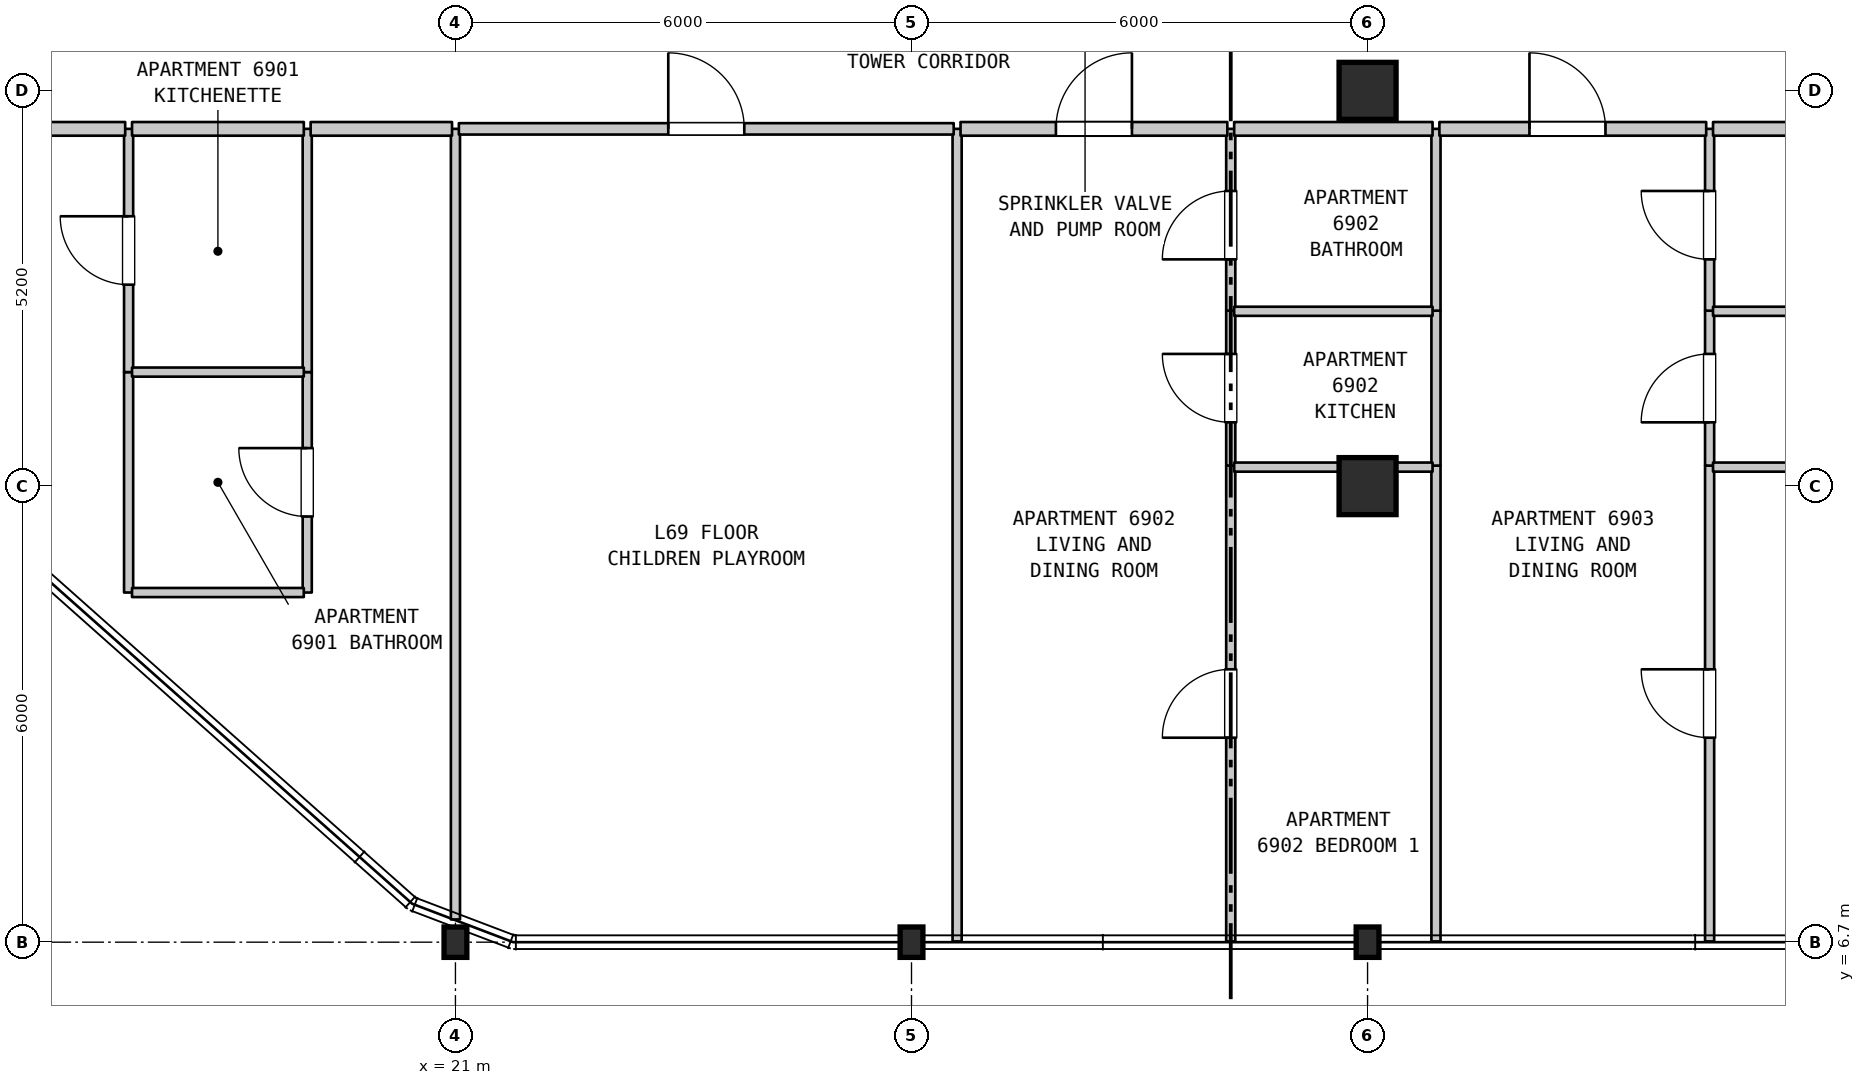
"""IFC4 building model, lengths in metres.
Left out: names, types, materials, properties, quantities, classifications, styles, units other than length and angle.
Written with IfcOpenShell. Run it as: python <this file> out.ifc"""

import sys

from ifc_helpers import new_model, si_unit, direction, frame, frame_2d, origin, origin_2d, place, context, subcontext, project, spatial, rectangle, i_section, extrude, element, fill, save


model = new_model("IFC4")
c1 = context("Model", 3, precision=1e-05, world=origin(), true_north=direction((0.0, 1.0)))
c2 = subcontext(c1, "Body", "Model", "MODEL_VIEW")
j1 = project(units=[si_unit("LENGTHUNIT", "METRE"), si_unit("PLANEANGLEUNIT", "RADIAN")], contexts=[c1])
p1 = place(None, origin())
s1 = spatial("IfcSite", under=j1, at=p1, CompositionType="ELEMENT")
p2 = place(p1, origin())
s2 = spatial("IfcBuilding", under=s1, at=p2, CompositionType="ELEMENT")
p3 = place(p2, frame((0.0, 0.0, 276.9)))
s3 = spatial("IfcBuildingStorey", under=s2, at=p3, CompositionType="ELEMENT", Elevation=276.9)
for number, where, z_axis, x_axis in (
    (1, (21.0, 6.7, 0.0), (0.0, 0.0, 1.0), (1.0, 0.0, 0.0)),
    (2, (27.0, 6.7, 0.0), (0.0, 0.0, 1.0), (1.0, 0.0, 0.0)),
    (3, (33.0, 6.7, 0.0), (0.0, 0.0, 1.0), (1.0, 0.0, 0.0)),
):
    element("IfcColumn", number, at=place(p3, frame(where, z_axis=z_axis, x_axis=x_axis)), inside=s3, PredefinedType="COLUMN", context=c2, shape_type="SweptSolid", body=[
        extrude(i_section(OverallWidth=0.3, OverallDepth=0.4, WebThickness=0.013, FlangeThickness=0.024, FilletRadius=0.027, at=origin_2d()), origin(), (0.0, 0.0, 1.0), 3.7),
    ])
for number, where, z_axis, x_axis in (
    (4, (33.0, 12.7, 0.0), (0.0, 0.0, 1.0), (1.0, 0.0, 0.0)),
    (5, (33.0, 17.9, 0.0), (0.0, 0.0, 1.0), (1.0, 0.0, 0.0)),
):
    element("IfcColumn", number, at=place(p3, frame(where, z_axis=z_axis, x_axis=x_axis)), inside=s3, PredefinedType="COLUMN", context=c2, shape_type="SweptSolid", body=[
        extrude(rectangle(XDim=0.75, YDim=0.75, at=origin_2d()), origin(), (0.0, 0.0, 1.0), 3.7),
    ])
p4 = place(p3, frame((16.7, 11.3, 0.0), z_axis=(0.0, 0.0, 1.0), x_axis=(0.0, 1.0, 0.0)))
e6 = element("IfcWall", 6, at=p4, inside=s3, PredefinedType="PARTITIONING", context=c2, shape_type="SweptSolid", body=[
    extrude(rectangle(XDim=2.9, YDim=0.12, at=frame_2d((1.45, 0.0))), origin(), (0.0, 0.0, 1.0), 3.39),
])
p5 = place(p3, frame((16.7, 14.2, 0.0), z_axis=(0.0, 0.0, 1.0), x_axis=(0.0, 1.0, 0.0)))
e7 = element("IfcWall", 7, at=p5, inside=s3, PredefinedType="PARTITIONING", context=c2, shape_type="SweptSolid", body=[
    extrude(rectangle(XDim=3.2, YDim=0.12, at=frame_2d((1.6, 0.0))), origin(), (0.0, 0.0, 1.0), 3.39),
])
p6 = place(p5, frame((1.15, 0.0, 0.0)))
e8 = element("IfcOpeningElement", 8, at=p6, cuts=e7, PredefinedType="OPENING", context=c2, shape_type="SweptSolid", body=[
    extrude(rectangle(XDim=0.9, YDim=2.15, at=frame_2d((0.45, 1.075))), frame((0.0, 0.07, 0.0), z_axis=(0.0, -1.0, 0.0), x_axis=(1.0, 0.0, 0.0)), (0.0, 0.0, 1.0), 0.14),
])
p7 = place(p3, frame((19.05, 11.3, 0.0), z_axis=(0.0, 0.0, 1.0), x_axis=(0.0, 1.0, 0.0)))
e9 = element("IfcWall", 9, at=p7, inside=s3, PredefinedType="PARTITIONING", context=c2, shape_type="SweptSolid", body=[
    extrude(rectangle(XDim=2.9, YDim=0.12, at=frame_2d((1.45, 0.0))), origin(), (0.0, 0.0, 1.0), 3.39),
])
p8 = place(p7, frame((1.0, 0.0, 0.0)))
e10 = element("IfcOpeningElement", 10, at=p8, cuts=e9, PredefinedType="OPENING", context=c2, shape_type="SweptSolid", body=[
    extrude(rectangle(XDim=0.9, YDim=2.1, at=frame_2d((0.45, 1.05))), frame((0.0, 0.07, 0.0), z_axis=(0.0, -1.0, 0.0), x_axis=(1.0, 0.0, 0.0)), (0.0, 0.0, 1.0), 0.14),
])
p9 = place(p3, frame((19.05, 14.2, 0.0), z_axis=(0.0, 0.0, 1.0), x_axis=(0.0, 1.0, 0.0)))
e11 = element("IfcWall", 11, at=p9, inside=s3, PredefinedType="PARTITIONING", context=c2, shape_type="SweptSolid", body=[
    extrude(rectangle(XDim=3.2, YDim=0.12, at=frame_2d((1.6, 0.0))), origin(), (0.0, 0.0, 1.0), 3.39),
])
p10 = place(p3, frame((21.0, 6.999, 0.0), z_axis=(0.0, 0.0, 1.0), x_axis=(0.0, 1.0, 0.0)))
e12 = element("IfcWall", 12, at=p10, inside=s3, PredefinedType="PARTITIONING", context=c2, shape_type="SweptSolid", body=[
    extrude(rectangle(XDim=10.401, YDim=0.12, at=frame_2d((5.2, 0.0))), origin(), (0.0, 0.0, 1.0), 3.39),
])
p11 = place(p3, frame((27.6, 6.71, 0.0), z_axis=(0.0, 0.0, 1.0), x_axis=(0.0, 1.0, 0.0)))
e13 = element("IfcWall", 13, at=p11, inside=s3, PredefinedType="PARTITIONING", context=c2, shape_type="SweptSolid", body=[
    extrude(rectangle(XDim=10.69, YDim=0.12, at=frame_2d((5.345, 0.0))), origin(), (0.0, 0.0, 1.0), 3.39),
])
p12 = place(p3, frame((31.2, 6.71, 0.0), z_axis=(0.0, 0.0, 1.0), x_axis=(0.0, 1.0, 0.0)))
e14 = element("IfcWall", 14, at=p12, inside=s3, PredefinedType="PARTITIONING", context=c2, shape_type="SweptSolid", body=[
    extrude(rectangle(XDim=6.26, YDim=0.12, at=frame_2d((3.13, 0.0))), origin(), (0.0, 0.0, 1.0), 3.39),
])
p13 = place(p12, frame((2.68, 0.0, 0.0)))
e15 = element("IfcOpeningElement", 15, at=p13, cuts=e14, PredefinedType="OPENING", context=c2, shape_type="SweptSolid", body=[
    extrude(rectangle(XDim=0.9, YDim=2.15, at=frame_2d((0.45, 1.075))), frame((0.0, 0.07, 0.0), z_axis=(0.0, -1.0, 0.0), x_axis=(1.0, 0.0, 0.0)), (0.0, 0.0, 1.0), 0.14),
])
p14 = place(p3, frame((31.2, 12.97, 0.0), z_axis=(0.0, 0.0, 1.0), x_axis=(0.0, 1.0, 0.0)))
e16 = element("IfcWall", 16, at=p14, inside=s3, PredefinedType="PARTITIONING", context=c2, shape_type="SweptSolid", body=[
    extrude(rectangle(XDim=2.038, YDim=0.12, at=frame_2d((1.019, 0.0))), origin(), (0.0, 0.0, 1.0), 3.39),
])
p15 = place(p14, frame((0.569, 0.0, 0.0)))
e17 = element("IfcOpeningElement", 17, at=p15, cuts=e16, PredefinedType="OPENING", context=c2, shape_type="SweptSolid", body=[
    extrude(rectangle(XDim=0.9, YDim=2.15, at=frame_2d((0.45, 1.075))), frame((0.0, 0.07, 0.0), z_axis=(0.0, -1.0, 0.0), x_axis=(1.0, 0.0, 0.0)), (0.0, 0.0, 1.0), 0.14),
])
p16 = place(p3, frame((31.2, 15.008, 0.0), z_axis=(0.0, 0.0, 1.0), x_axis=(0.0, 1.0, 0.0)))
e18 = element("IfcWall", 18, at=p16, inside=s3, PredefinedType="PARTITIONING", context=c2, shape_type="SweptSolid", body=[
    extrude(rectangle(XDim=2.392, YDim=0.12, at=frame_2d((1.196, 0.0))), origin(), (0.0, 0.0, 1.0), 3.39),
])
p17 = place(p16, frame((0.675, 0.0, 0.0)))
e19 = element("IfcOpeningElement", 19, at=p17, cuts=e18, PredefinedType="OPENING", context=c2, shape_type="SweptSolid", body=[
    extrude(rectangle(XDim=0.9, YDim=2.1, at=frame_2d((0.45, 1.05))), frame((0.0, 0.07, 0.0), z_axis=(0.0, -1.0, 0.0), x_axis=(1.0, 0.0, 0.0)), (0.0, 0.0, 1.0), 0.14),
])
p18 = place(p3, frame((33.9, 6.71, 0.0), z_axis=(0.0, 0.0, 1.0), x_axis=(0.0, 1.0, 0.0)))
e20 = element("IfcWall", 20, at=p18, inside=s3, PredefinedType="PARTITIONING", context=c2, shape_type="SweptSolid", body=[
    extrude(rectangle(XDim=6.26, YDim=0.12, at=frame_2d((3.13, 0.0))), origin(), (0.0, 0.0, 1.0), 3.39),
])
p19 = place(p3, frame((33.9, 12.97, 0.0), z_axis=(0.0, 0.0, 1.0), x_axis=(0.0, 1.0, 0.0)))
e21 = element("IfcWall", 21, at=p19, inside=s3, PredefinedType="PARTITIONING", context=c2, shape_type="SweptSolid", body=[
    extrude(rectangle(XDim=2.038, YDim=0.12, at=frame_2d((1.019, 0.0))), origin(), (0.0, 0.0, 1.0), 3.39),
])
p20 = place(p3, frame((33.9, 15.008, 0.0), z_axis=(0.0, 0.0, 1.0), x_axis=(0.0, 1.0, 0.0)))
e22 = element("IfcWall", 22, at=p20, inside=s3, PredefinedType="PARTITIONING", context=c2, shape_type="SweptSolid", body=[
    extrude(rectangle(XDim=2.392, YDim=0.12, at=frame_2d((1.196, 0.0))), origin(), (0.0, 0.0, 1.0), 3.39),
])
p21 = place(p3, frame((37.5, 6.71, 0.0), z_axis=(0.0, 0.0, 1.0), x_axis=(0.0, 1.0, 0.0)))
e23 = element("IfcWall", 23, at=p21, inside=s3, PredefinedType="PARTITIONING", context=c2, shape_type="SweptSolid", body=[
    extrude(rectangle(XDim=6.26, YDim=0.12, at=frame_2d((3.13, 0.0))), origin(), (0.0, 0.0, 1.0), 3.39),
])
p22 = place(p21, frame((2.68, 0.0, 0.0)))
e24 = element("IfcOpeningElement", 24, at=p22, cuts=e23, PredefinedType="OPENING", context=c2, shape_type="SweptSolid", body=[
    extrude(rectangle(XDim=0.9, YDim=2.15, at=frame_2d((0.45, 1.075))), frame((0.0, 0.07, 0.0), z_axis=(0.0, -1.0, 0.0), x_axis=(1.0, 0.0, 0.0)), (0.0, 0.0, 1.0), 0.14),
])
p23 = place(p3, frame((37.5, 12.97, 0.0), z_axis=(0.0, 0.0, 1.0), x_axis=(0.0, 1.0, 0.0)))
e25 = element("IfcWall", 25, at=p23, inside=s3, PredefinedType="PARTITIONING", context=c2, shape_type="SweptSolid", body=[
    extrude(rectangle(XDim=2.038, YDim=0.12, at=frame_2d((1.019, 0.0))), origin(), (0.0, 0.0, 1.0), 3.39),
])
p24 = place(p23, frame((0.569, 0.0, 0.0)))
e26 = element("IfcOpeningElement", 26, at=p24, cuts=e25, PredefinedType="OPENING", context=c2, shape_type="SweptSolid", body=[
    extrude(rectangle(XDim=0.9, YDim=2.15, at=frame_2d((0.45, 1.075))), frame((0.0, 0.07, 0.0), z_axis=(0.0, -1.0, 0.0), x_axis=(1.0, 0.0, 0.0)), (0.0, 0.0, 1.0), 0.14),
])
p25 = place(p3, frame((37.5, 15.008, 0.0), z_axis=(0.0, 0.0, 1.0), x_axis=(0.0, 1.0, 0.0)))
e27 = element("IfcWall", 27, at=p25, inside=s3, PredefinedType="PARTITIONING", context=c2, shape_type="SweptSolid", body=[
    extrude(rectangle(XDim=2.392, YDim=0.12, at=frame_2d((1.196, 0.0))), origin(), (0.0, 0.0, 1.0), 3.39),
])
p26 = place(p25, frame((0.675, 0.0, 0.0)))
e28 = element("IfcOpeningElement", 28, at=p26, cuts=e27, PredefinedType="OPENING", context=c2, shape_type="SweptSolid", body=[
    extrude(rectangle(XDim=0.9, YDim=2.1, at=frame_2d((0.45, 1.05))), frame((0.0, 0.07, 0.0), z_axis=(0.0, -1.0, 0.0), x_axis=(1.0, 0.0, 0.0)), (0.0, 0.0, 1.0), 0.14),
])
p27 = place(p3, frame((16.745, 11.3, 0.0), z_axis=(0.0, 0.0, 1.0), x_axis=(1.0, 0.0, 0.0)))
e29 = element("IfcWall", 29, at=p27, inside=s3, PredefinedType="PARTITIONING", context=c2, shape_type="SweptSolid", body=[
    extrude(rectangle(XDim=2.26, YDim=0.12, at=frame_2d((1.13, 0.0))), origin(), (0.0, 0.0, 1.0), 3.39),
])
p28 = place(p3, frame((31.245, 12.95, 0.0), z_axis=(0.0, 0.0, 1.0), x_axis=(1.0, 0.0, 0.0)))
e30 = element("IfcWall", 30, at=p28, inside=s3, PredefinedType="PARTITIONING", context=c2, shape_type="SweptSolid", body=[
    extrude(rectangle(XDim=2.61, YDim=0.12, at=frame_2d((1.305, 0.0))), origin(), (0.0, 0.0, 1.0), 3.39),
])
p29 = place(p3, frame((37.545, 12.95, 0.0), z_axis=(0.0, 0.0, 1.0), x_axis=(1.0, 0.0, 0.0)))
e31 = element("IfcWall", 31, at=p29, inside=s3, PredefinedType="PARTITIONING", context=c2, shape_type="SweptSolid", body=[
    extrude(rectangle(XDim=5.329, YDim=0.12, at=frame_2d((2.665, 0.0))), origin(), (0.0, 0.0, 1.0), 3.39),
])
p30 = place(p3, frame((16.745, 14.2, 0.0), z_axis=(0.0, 0.0, 1.0), x_axis=(1.0, 0.0, 0.0)))
e32 = element("IfcWall", 32, at=p30, inside=s3, PredefinedType="PARTITIONING", context=c2, shape_type="SweptSolid", body=[
    extrude(rectangle(XDim=2.26, YDim=0.12, at=frame_2d((1.13, 0.0))), origin(), (0.0, 0.0, 1.0), 3.39),
])
p31 = place(p3, frame((31.245, 15.0, 0.0), z_axis=(0.0, 0.0, 1.0), x_axis=(1.0, 0.0, 0.0)))
e33 = element("IfcWall", 33, at=p31, inside=s3, PredefinedType="PARTITIONING", context=c2, shape_type="SweptSolid", body=[
    extrude(rectangle(XDim=2.61, YDim=0.12, at=frame_2d((1.305, 0.0))), origin(), (0.0, 0.0, 1.0), 3.39),
])
p32 = place(p3, frame((37.545, 15.0, 0.0), z_axis=(0.0, 0.0, 1.0), x_axis=(1.0, 0.0, 0.0)))
e34 = element("IfcWall", 34, at=p32, inside=s3, PredefinedType="PARTITIONING", context=c2, shape_type="SweptSolid", body=[
    extrude(rectangle(XDim=5.619, YDim=0.12, at=frame_2d((2.81, 0.0))), origin(), (0.0, 0.0, 1.0), 3.39),
])
p33 = place(p3, frame((12.975, 17.4, 0.0), z_axis=(0.0, 0.0, 1.0), x_axis=(1.0, 0.0, 0.0)))
e35 = element("IfcWall", 35, at=p33, inside=s3, PredefinedType="STANDARD", context=c2, shape_type="SweptSolid", body=[
    extrude(rectangle(XDim=3.68, YDim=0.18, at=frame_2d((1.84, 0.0))), origin(), (0.0, 0.0, 1.0), 3.39),
])
p34 = place(p33, frame((0.322, 0.0, 0.0)))
e36 = element("IfcOpeningElement", 36, at=p34, cuts=e35, PredefinedType="OPENING", context=c2, shape_type="SweptSolid", body=[
    extrude(rectangle(XDim=1.0, YDim=2.15, at=frame_2d((0.5, 1.075))), frame((0.0, 0.1, 0.0), z_axis=(0.0, -1.0, 0.0), x_axis=(1.0, 0.0, 0.0)), (0.0, 0.0, 1.0), 0.2),
])
p35 = place(p3, frame((16.745, 17.4, 0.0), z_axis=(0.0, 0.0, 1.0), x_axis=(1.0, 0.0, 0.0)))
e37 = element("IfcWall", 37, at=p35, inside=s3, PredefinedType="STANDARD", context=c2, shape_type="SweptSolid", body=[
    extrude(rectangle(XDim=2.26, YDim=0.18, at=frame_2d((1.13, 0.0))), origin(), (0.0, 0.0, 1.0), 3.39),
])
p36 = place(p3, frame((19.095, 17.4, 0.0), z_axis=(0.0, 0.0, 1.0), x_axis=(1.0, 0.0, 0.0)))
e38 = element("IfcWall", 38, at=p36, inside=s3, PredefinedType="STANDARD", context=c2, shape_type="SweptSolid", body=[
    extrude(rectangle(XDim=1.86, YDim=0.18, at=frame_2d((0.93, 0.0))), origin(), (0.0, 0.0, 1.0), 3.39),
])
p37 = place(p3, frame((21.045, 17.4, 0.0), z_axis=(0.0, 0.0, 1.0), x_axis=(1.0, 0.0, 0.0)))
e39 = element("IfcWall", 39, at=p37, inside=s3, PredefinedType="STANDARD", context=c2, shape_type="SweptSolid", body=[
    extrude(rectangle(XDim=6.51, YDim=0.15, at=frame_2d((3.255, 0.0))), origin(), (0.0, 0.0, 1.0), 3.39),
])
p38 = place(p37, frame((2.755, 0.0, 0.0)))
e40 = element("IfcOpeningElement", 40, at=p38, cuts=e39, PredefinedType="OPENING", context=c2, shape_type="SweptSolid", body=[
    extrude(rectangle(XDim=1.0, YDim=2.15, at=frame_2d((0.5, 1.075))), frame((0.0, 0.085, 0.0), z_axis=(0.0, -1.0, 0.0), x_axis=(1.0, 0.0, 0.0)), (0.0, 0.0, 1.0), 0.17),
])
p39 = place(p3, frame((27.645, 17.4, 0.0), z_axis=(0.0, 0.0, 1.0), x_axis=(1.0, 0.0, 0.0)))
e41 = element("IfcWall", 41, at=p39, inside=s3, PredefinedType="STANDARD", context=c2, shape_type="SweptSolid", body=[
    extrude(rectangle(XDim=3.51, YDim=0.18, at=frame_2d((1.755, 0.0))), origin(), (0.0, 0.0, 1.0), 3.39),
])
p40 = place(p39, frame((1.255, 0.0, 0.0)))
e42 = element("IfcOpeningElement", 42, at=p40, cuts=e41, PredefinedType="OPENING", context=c2, shape_type="SweptSolid", body=[
    extrude(rectangle(XDim=1.0, YDim=2.15, at=frame_2d((0.5, 1.075))), frame((0.0, 0.1, 0.0), z_axis=(0.0, -1.0, 0.0), x_axis=(1.0, 0.0, 0.0)), (0.0, 0.0, 1.0), 0.2),
])
p41 = place(p3, frame((31.245, 17.4, 0.0), z_axis=(0.0, 0.0, 1.0), x_axis=(1.0, 0.0, 0.0)))
e43 = element("IfcWall", 43, at=p41, inside=s3, PredefinedType="STANDARD", context=c2, shape_type="SweptSolid", body=[
    extrude(rectangle(XDim=2.61, YDim=0.18, at=frame_2d((1.305, 0.0))), origin(), (0.0, 0.0, 1.0), 3.39),
])
p42 = place(p3, frame((33.945, 17.4, 0.0), z_axis=(0.0, 0.0, 1.0), x_axis=(1.0, 0.0, 0.0)))
e44 = element("IfcWall", 44, at=p42, inside=s3, PredefinedType="STANDARD", context=c2, shape_type="SweptSolid", body=[
    extrude(rectangle(XDim=3.51, YDim=0.18, at=frame_2d((1.755, 0.0))), origin(), (0.0, 0.0, 1.0), 3.39),
])
p43 = place(p42, frame((1.185, 0.0, 0.0)))
e45 = element("IfcOpeningElement", 45, at=p43, cuts=e44, PredefinedType="OPENING", context=c2, shape_type="SweptSolid", body=[
    extrude(rectangle(XDim=1.0, YDim=2.15, at=frame_2d((0.5, 1.075))), frame((0.0, 0.1, 0.0), z_axis=(0.0, -1.0, 0.0), x_axis=(1.0, 0.0, 0.0)), (0.0, 0.0, 1.0), 0.2),
])
p44 = place(p3, frame((37.545, 17.4, 0.0), z_axis=(0.0, 0.0, 1.0), x_axis=(1.0, 0.0, 0.0)))
e46 = element("IfcWall", 46, at=p44, inside=s3, PredefinedType="STANDARD", context=c2, shape_type="SweptSolid", body=[
    extrude(rectangle(XDim=3.585, YDim=0.18, at=frame_2d((1.792, 0.0))), origin(), (0.0, 0.0, 1.0), 3.39),
])
p45 = place(p6, origin())
e47 = element("IfcDoor", 47, at=p45, inside=s3, OperationType="SINGLE_SWING_RIGHT", PredefinedType="DOOR", context=c2, shape_type="SweptSolid", body=[
    extrude(rectangle(XDim=0.9, YDim=2.15, at=frame_2d((0.45, 1.075))), frame((0.0, 0.025, 0.0), z_axis=(0.0, -1.0, 0.0), x_axis=(1.0, 0.0, 0.0)), (0.0, 0.0, 1.0), 0.05),
])
fill(e8, e47)
p46 = place(p8, origin())
e48 = element("IfcDoor", 48, at=p46, inside=s3, OperationType="SINGLE_SWING_RIGHT", PredefinedType="DOOR", context=c2, shape_type="SweptSolid", body=[
    extrude(rectangle(XDim=0.9, YDim=2.1, at=frame_2d((0.45, 1.05))), frame((0.0, 0.025, 0.0), z_axis=(0.0, -1.0, 0.0), x_axis=(1.0, 0.0, 0.0)), (0.0, 0.0, 1.0), 0.05),
])
fill(e10, e48)
p47 = place(p13, origin())
e49 = element("IfcDoor", 49, at=p47, inside=s3, OperationType="SINGLE_SWING_LEFT", PredefinedType="DOOR", context=c2, shape_type="SweptSolid", body=[
    extrude(rectangle(XDim=0.9, YDim=2.15, at=frame_2d((0.45, 1.075))), frame((0.0, 0.025, 0.0), z_axis=(0.0, -1.0, 0.0), x_axis=(1.0, 0.0, 0.0)), (0.0, 0.0, 1.0), 0.05),
])
fill(e15, e49)
p48 = place(p15, origin())
e50 = element("IfcDoor", 50, at=p48, inside=s3, OperationType="SINGLE_SWING_RIGHT", PredefinedType="DOOR", context=c2, shape_type="SweptSolid", body=[
    extrude(rectangle(XDim=0.9, YDim=2.15, at=frame_2d((0.45, 1.075))), frame((0.0, 0.025, 0.0), z_axis=(0.0, -1.0, 0.0), x_axis=(1.0, 0.0, 0.0)), (0.0, 0.0, 1.0), 0.05),
])
fill(e17, e50)
p49 = place(p17, origin())
e51 = element("IfcDoor", 51, at=p49, inside=s3, OperationType="SINGLE_SWING_LEFT", PredefinedType="DOOR", context=c2, shape_type="SweptSolid", body=[
    extrude(rectangle(XDim=0.9, YDim=2.1, at=frame_2d((0.45, 1.05))), frame((0.0, 0.025, 0.0), z_axis=(0.0, -1.0, 0.0), x_axis=(1.0, 0.0, 0.0)), (0.0, 0.0, 1.0), 0.05),
])
fill(e19, e51)
p50 = place(p22, origin())
e52 = element("IfcDoor", 52, at=p50, inside=s3, OperationType="SINGLE_SWING_RIGHT", PredefinedType="DOOR", context=c2, shape_type="SweptSolid", body=[
    extrude(rectangle(XDim=0.9, YDim=2.15, at=frame_2d((0.45, 1.075))), frame((0.0, 0.025, 0.0), z_axis=(0.0, -1.0, 0.0), x_axis=(1.0, 0.0, 0.0)), (0.0, 0.0, 1.0), 0.05),
])
fill(e24, e52)
p51 = place(p24, origin())
e53 = element("IfcDoor", 53, at=p51, inside=s3, OperationType="SINGLE_SWING_LEFT", PredefinedType="DOOR", context=c2, shape_type="SweptSolid", body=[
    extrude(rectangle(XDim=0.9, YDim=2.15, at=frame_2d((0.45, 1.075))), frame((0.0, 0.025, 0.0), z_axis=(0.0, -1.0, 0.0), x_axis=(1.0, 0.0, 0.0)), (0.0, 0.0, 1.0), 0.05),
])
fill(e26, e53)
p52 = place(p26, origin())
e54 = element("IfcDoor", 54, at=p52, inside=s3, OperationType="SINGLE_SWING_RIGHT", PredefinedType="DOOR", context=c2, shape_type="SweptSolid", body=[
    extrude(rectangle(XDim=0.9, YDim=2.1, at=frame_2d((0.45, 1.05))), frame((0.0, 0.025, 0.0), z_axis=(0.0, -1.0, 0.0), x_axis=(1.0, 0.0, 0.0)), (0.0, 0.0, 1.0), 0.05),
])
fill(e28, e54)
p53 = place(p38, origin())
e55 = element("IfcDoor", 55, at=p53, inside=s3, OperationType="SINGLE_SWING_LEFT", PredefinedType="DOOR", context=c2, shape_type="SweptSolid", body=[
    extrude(rectangle(XDim=1.0, YDim=2.15, at=frame_2d((0.5, 1.075))), frame((0.0, 0.025, 0.0), z_axis=(0.0, -1.0, 0.0), x_axis=(1.0, 0.0, 0.0)), (0.0, 0.0, 1.0), 0.05),
])
fill(e40, e55)
p54 = place(p40, origin())
e56 = element("IfcDoor", 56, at=p54, inside=s3, OperationType="SINGLE_SWING_RIGHT", PredefinedType="DOOR", context=c2, shape_type="SweptSolid", body=[
    extrude(rectangle(XDim=1.0, YDim=2.15, at=frame_2d((0.5, 1.075))), frame((0.0, 0.025, 0.0), z_axis=(0.0, -1.0, 0.0), x_axis=(1.0, 0.0, 0.0)), (0.0, 0.0, 1.0), 0.05),
])
fill(e42, e56)
p55 = place(p43, origin())
e57 = element("IfcDoor", 57, at=p55, inside=s3, OperationType="SINGLE_SWING_LEFT", PredefinedType="DOOR", context=c2, shape_type="SweptSolid", body=[
    extrude(rectangle(XDim=1.0, YDim=2.15, at=frame_2d((0.5, 1.075))), frame((0.0, 0.025, 0.0), z_axis=(0.0, -1.0, 0.0), x_axis=(1.0, 0.0, 0.0)), (0.0, 0.0, 1.0), 0.05),
])
fill(e45, e57)
save(model, sys.argv[1])
